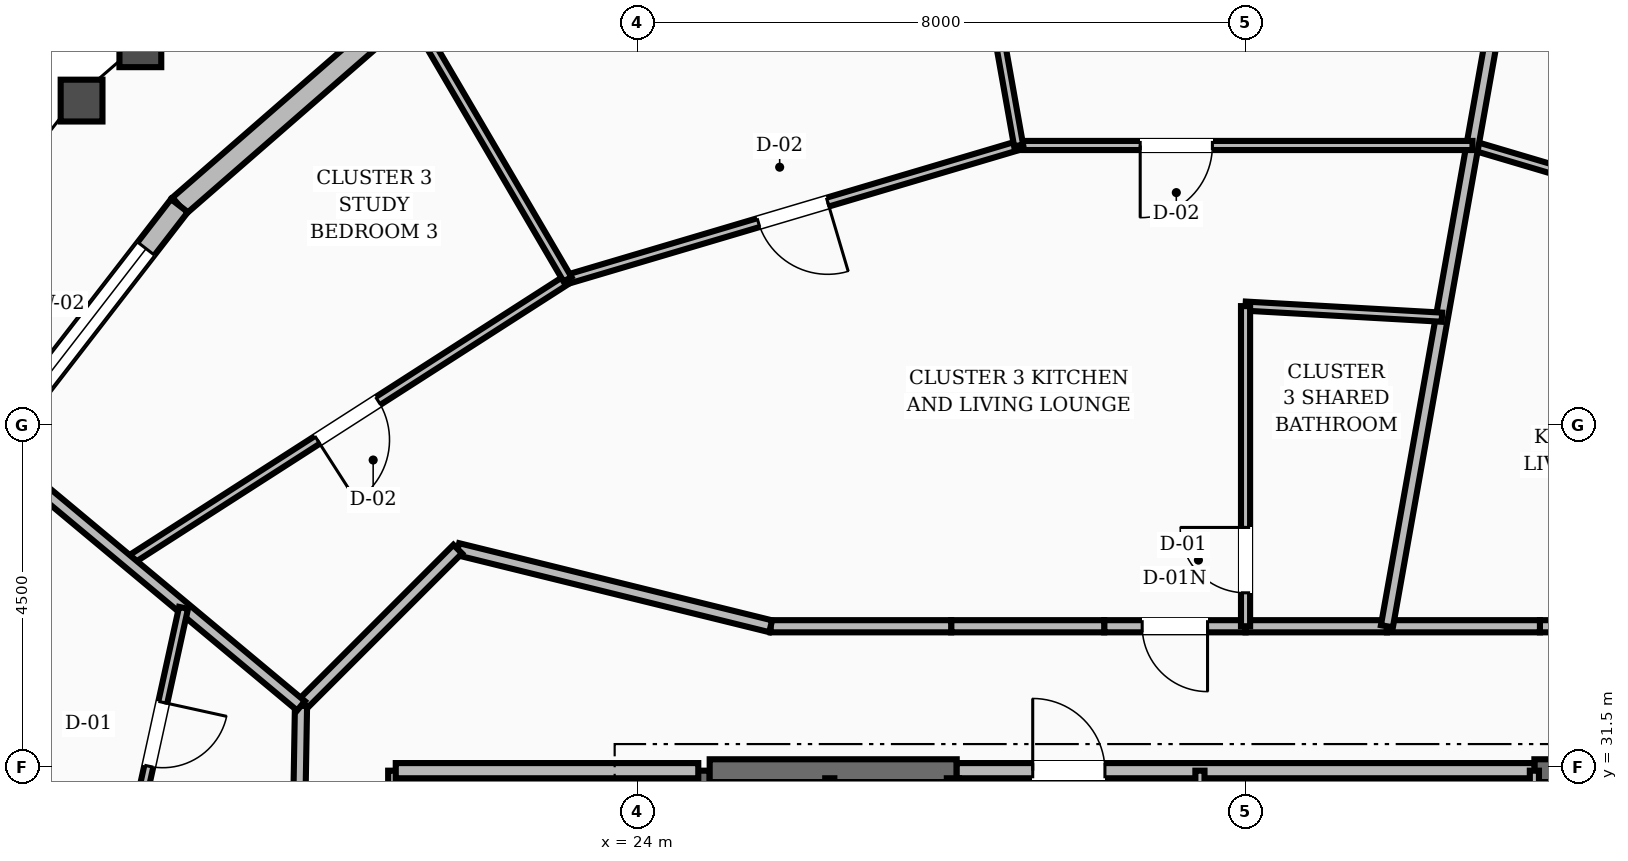
"""IFC4 building model, lengths in metres.
Left out: names, types, materials, properties, quantities, classifications, styles, units other than length and angle.
Written with IfcOpenShell. Run it as: python <this file> out.ifc"""

import sys

from ifc_helpers import new_model, si_unit, direction, frame, frame_2d, origin, place, context, subcontext, project, spatial, rectangle, extrude, element, fill, save


model = new_model("IFC4")
c1 = context("Model", 3, precision=1e-05, world=origin(), true_north=direction((0.0, 1.0)))
c2 = subcontext(c1, "Body", "Model", "MODEL_VIEW")
j1 = project(units=[si_unit("LENGTHUNIT", "METRE"), si_unit("PLANEANGLEUNIT", "RADIAN")], contexts=[c1])
p1 = place(None, origin())
s1 = spatial("IfcSite", under=j1, at=p1, CompositionType="ELEMENT")
p2 = place(p1, origin())
s2 = spatial("IfcBuilding", under=s1, at=p2, CompositionType="ELEMENT")
p3 = place(p2, frame((0.0, 0.0, 265.2)))
s3 = spatial("IfcBuildingStorey", under=s2, at=p3, CompositionType="ELEMENT", Elevation=265.2)
p4 = place(p3, frame((24.8, 25.15, 0.0), z_axis=(0.0, 0.0, 1.0), x_axis=(0.0, 1.0, 0.0)))
e1 = element("IfcWall", 1, at=p4, inside=s3, PredefinedType="SHEAR", context=c2, shape_type="SweptSolid", body=[
    extrude(rectangle(XDim=6.3, YDim=0.3, at=frame_2d((3.15, 0.0))), origin(), (0.0, 0.0, 1.0), 3.6),
])
p5 = place(p3, frame((24.95, 31.45, 0.0), z_axis=(0.0, 0.0, 1.0), x_axis=(1.0, 0.0, 0.0)))
e2 = element("IfcWall", 2, at=p5, inside=s3, PredefinedType="SHEAR", context=c2, shape_type="SweptSolid", body=[
    extrude(rectangle(XDim=3.25, YDim=0.3, at=frame_2d((1.625, 0.0))), origin(), (0.0, 0.0, 1.0), 3.6),
])
p6 = place(p3, frame((35.8, 31.45, 0.0), z_axis=(0.0, 0.0, 1.0), x_axis=(1.0, 0.0, 0.0)))
e3 = element("IfcWall", 3, at=p6, inside=s3, PredefinedType="SHEAR", context=c2, shape_type="SweptSolid", body=[
    extrude(rectangle(XDim=3.25, YDim=0.3, at=frame_2d((1.625, 0.0))), origin(), (0.0, 0.0, 1.0), 3.6),
])
p7 = place(p6, frame((0.3, 0.0, 0.0)))
e4 = element("IfcOpeningElement", 4, at=p7, cuts=e3, PredefinedType="OPENING", context=c2, shape_type="SweptSolid", body=[
    extrude(rectangle(XDim=1.1, YDim=2.1, at=frame_2d((0.55, 1.05))), frame((0.0, 0.16, 0.0), z_axis=(0.0, -1.0, 0.0), x_axis=(1.0, 0.0, 0.0)), (0.0, 0.0, 1.0), 0.32),
])
p8 = place(p3, frame((20.979, 41.502, 0.0), z_axis=(0.0, 0.0, 1.0), x_axis=(-0.75414910989, -0.656703220681, 0.0)))
e5 = element("IfcWall", 5, at=p8, inside=s3, PredefinedType="STANDARD", context=c2, shape_type="SweptSolid", body=[
    extrude(rectangle(XDim=3.986, YDim=0.28, at=frame_2d((1.993, 0.0))), origin(), (0.0, 0.0, 1.0), 2.88),
])
p9 = place(p3, frame((17.973, 38.884, 0.0), z_axis=(0.0, 0.0, 1.0), x_axis=(-0.611762796107, -0.791041263968, 0.0)))
e6 = element("IfcWall", 6, at=p9, inside=s3, PredefinedType="STANDARD", context=c2, shape_type="SweptSolid", body=[
    extrude(rectangle(XDim=4.032, YDim=0.28, at=frame_2d((2.016, 0.0))), origin(), (0.0, 0.0, 1.0), 2.88),
])
p10 = place(p9, frame((0.716, 0.0, 0.8)))
e7 = element("IfcOpeningElement", 7, at=p10, cuts=e6, PredefinedType="OPENING", context=c2, shape_type="SweptSolid", body=[
    extrude(rectangle(XDim=2.6, YDim=1.65, at=frame_2d((1.3, 0.825))), frame((0.0, 0.15, 0.0), z_axis=(0.0, -1.0, 0.0), x_axis=(1.0, 0.0, 0.0)), (0.0, 0.0, 1.0), 0.3),
])
p11 = place(p3, frame((20.82, 28.32, 0.0), z_axis=(0.0, 0.0, 1.0), x_axis=(0.0, 1.0, 0.0)))
e8 = element("IfcWall", 8, at=p11, inside=s3, PredefinedType="SOLIDWALL", context=c2, shape_type="SweptSolid", body=[
    extrude(rectangle(XDim=3.13, YDim=0.2, at=frame_2d((1.565, 0.0))), origin(), (0.0, 0.0, 1.0), 2.87),
])
p12 = place(p11, frame((1.09, 0.0, 0.0)))
e9 = element("IfcOpeningElement", 9, at=p12, cuts=e8, PredefinedType="OPENING", context=c2, shape_type="SweptSolid", body=[
    extrude(rectangle(XDim=0.95, YDim=2.1, at=frame_2d((0.475, 1.05))), frame((0.0, 0.11, 0.0), z_axis=(0.0, -1.0, 0.0), x_axis=(1.0, 0.0, 0.0)), (0.0, 0.0, 1.0), 0.22),
])
p13 = place(p3, frame((20.82, 31.45, 0.0), z_axis=(0.0, 0.0, 1.0), x_axis=(1.0, 0.0, 0.0)))
e10 = element("IfcWall", 10, at=p13, inside=s3, PredefinedType="SOLIDWALL", context=c2, shape_type="SweptSolid", body=[
    extrude(rectangle(XDim=3.98, YDim=0.2, at=frame_2d((1.99, 0.0))), origin(), (0.0, 0.0, 1.0), 2.87),
])
p14 = place(p3, frame((28.2, 31.45, 0.0), z_axis=(0.0, 0.0, 1.0), x_axis=(1.0, 0.0, 0.0)))
e11 = element("IfcWall", 11, at=p14, inside=s3, PredefinedType="SOLIDWALL", context=c2, shape_type="SweptSolid", body=[
    extrude(rectangle(XDim=7.6, YDim=0.2, at=frame_2d((3.8, 0.0))), origin(), (0.0, 0.0, 1.0), 2.87),
])
p15 = place(p14, frame((1.0, 0.0, 0.0)))
e12 = element("IfcOpeningElement", 12, at=p15, cuts=e11, PredefinedType="OPENING", context=c2, shape_type="SweptSolid", body=[
    extrude(rectangle(XDim=0.95, YDim=2.1, at=frame_2d((0.475, 1.05))), frame((0.0, 0.11, 0.0), z_axis=(0.0, -1.0, 0.0), x_axis=(1.0, 0.0, 0.0)), (0.0, 0.0, 1.0), 0.22),
])
p16 = place(p3, frame((35.8, 27.95, 0.0), z_axis=(0.0, 0.0, 1.0), x_axis=(0.0, 1.0, 0.0)))
e13 = element("IfcWall", 13, at=p16, inside=s3, PredefinedType="PARTITIONING", context=c2, shape_type="SweptSolid", body=[
    extrude(rectangle(XDim=3.5, YDim=0.12, at=frame_2d((1.75, 0.0))), origin(), (0.0, 0.0, 1.0), 2.87),
])
p17 = place(p16, frame((1.275, 0.0, 0.0)))
e14 = element("IfcOpeningElement", 14, at=p17, cuts=e13, PredefinedType="OPENING", context=c2, shape_type="SweptSolid", body=[
    extrude(rectangle(XDim=0.95, YDim=2.1, at=frame_2d((0.475, 1.05))), frame((0.0, 0.07, 0.0), z_axis=(0.0, -1.0, 0.0), x_axis=(1.0, 0.0, 0.0)), (0.0, 0.0, 1.0), 0.14),
])
p18 = place(p3, frame((31.4, 27.95, 0.0), z_axis=(0.0, 0.0, 1.0), x_axis=(0.0, 1.0, 0.0)))
e15 = element("IfcWall", 15, at=p18, inside=s3, PredefinedType="PARTITIONING", context=c2, shape_type="SweptSolid", body=[
    extrude(rectangle(XDim=3.5, YDim=0.12, at=frame_2d((1.75, 0.0))), origin(), (0.0, 0.0, 1.0), 2.87),
])
p19 = place(p3, frame((28.15, 25.25, 0.0), z_axis=(0.0, 0.0, 1.0), x_axis=(0.0, 1.0, 0.0)))
e16 = element("IfcWall", 16, at=p19, inside=s3, PredefinedType="SOLIDWALL", context=c2, shape_type="SweptSolid", body=[
    extrude(rectangle(XDim=6.1, YDim=0.16, at=frame_2d((3.05, 0.0))), origin(), (0.0, 0.0, 1.0), 2.87),
])
p20 = place(p3, frame((26.53, 25.25, 0.0), z_axis=(0.0, 0.0, 1.0), x_axis=(0.0, 1.0, 0.0)))
e17 = element("IfcWall", 17, at=p20, inside=s3, PredefinedType="PARTITIONING", context=c2, shape_type="SweptSolid", body=[
    extrude(rectangle(XDim=6.1, YDim=0.12, at=frame_2d((3.05, 0.0))), origin(), (0.0, 0.0, 1.0), 2.87),
])
p21 = place(p3, frame((38.248, 33.35, 0.0), z_axis=(0.0, 0.0, 1.0), x_axis=(-1.0, 0.0, 0.0)))
e18 = element("IfcWall", 18, at=p21, inside=s3, PredefinedType="SOLIDWALL", context=c2, shape_type="SweptSolid", body=[
    extrude(rectangle(XDim=2.375, YDim=0.16, at=frame_2d((1.188, 0.0))), origin(), (0.0, 0.0, 1.0), 2.87),
])
p22 = place(p3, frame((35.873, 33.35, 0.0), z_axis=(0.0, 0.0, 1.0), x_axis=(-1.0, 0.0, 0.0)))
e19 = element("IfcWall", 19, at=p22, inside=s3, PredefinedType="SOLIDWALL", context=c2, shape_type="SweptSolid", body=[
    extrude(rectangle(XDim=2.013, YDim=0.16, at=frame_2d((1.006, 0.0))), origin(), (0.0, 0.0, 1.0), 2.87),
])
p23 = place(p3, frame((33.86, 33.35, 0.0), z_axis=(0.0, 0.0, 1.0), x_axis=(-1.0, 0.0, 0.0)))
e20 = element("IfcWall", 20, at=p23, inside=s3, PredefinedType="SOLIDWALL", context=c2, shape_type="SweptSolid", body=[
    extrude(rectangle(XDim=1.86, YDim=0.16, at=frame_2d((0.93, 0.0))), origin(), (0.0, 0.0, 1.0), 2.87),
])
p24 = place(p3, frame((32.0, 33.35, 0.0), z_axis=(0.0, 0.0, 1.0), x_axis=(-1.0, 0.0, 0.0)))
e21 = element("IfcWall", 21, at=p24, inside=s3, PredefinedType="SOLIDWALL", context=c2, shape_type="SweptSolid", body=[
    extrude(rectangle(XDim=1.86, YDim=0.16, at=frame_2d((0.93, 0.0))), origin(), (0.0, 0.0, 1.0), 2.87),
])
p25 = place(p24, frame((0.5, 0.0, 0.0)))
e22 = element("IfcOpeningElement", 22, at=p25, cuts=e21, PredefinedType="OPENING", context=c2, shape_type="SweptSolid", body=[
    extrude(rectangle(XDim=0.86, YDim=2.1, at=frame_2d((0.43, 1.05))), frame((0.0, 0.09, 0.0), z_axis=(0.0, -1.0, 0.0), x_axis=(1.0, 0.0, 0.0)), (0.0, 0.0, 1.0), 0.18),
])
p26 = place(p3, frame((30.14, 33.35, 0.0), z_axis=(0.0, 0.0, 1.0), x_axis=(-1.0, 0.0, 0.0)))
e23 = element("IfcWall", 23, at=p26, inside=s3, PredefinedType="SOLIDWALL", context=c2, shape_type="SweptSolid", body=[
    extrude(rectangle(XDim=2.013, YDim=0.16, at=frame_2d((1.006, 0.0))), origin(), (0.0, 0.0, 1.0), 2.87),
])
p27 = place(p3, frame((28.127, 33.35, 0.0), z_axis=(0.0, 0.0, 1.0), x_axis=(-1.0, 0.0, 0.0)))
e24 = element("IfcWall", 24, at=p27, inside=s3, PredefinedType="SOLIDWALL", context=c2, shape_type="SweptSolid", body=[
    extrude(rectangle(XDim=2.375, YDim=0.16, at=frame_2d((1.188, 0.0))), origin(), (0.0, 0.0, 1.0), 2.87),
])
p28 = place(p3, frame((25.752, 33.35, 0.0), z_axis=(0.0, 0.0, 1.0), x_axis=(-0.970939799552, 0.239323850978, 0.0)))
e25 = element("IfcWall", 25, at=p28, inside=s3, PredefinedType="SOLIDWALL", context=c2, shape_type="SweptSolid", body=[
    extrude(rectangle(XDim=4.241, YDim=0.16, at=frame_2d((2.12, 0.0))), origin(), (0.0, 0.0, 1.0), 2.87),
])
p29 = place(p3, frame((21.635, 34.365, 0.0), z_axis=(0.0, 0.0, 1.0), x_axis=(-0.707106781187, -0.707106781187, 0.0)))
e26 = element("IfcWall", 26, at=p29, inside=s3, PredefinedType="SOLIDWALL", context=c2, shape_type="SweptSolid", body=[
    extrude(rectangle(XDim=2.916, YDim=0.16, at=frame_2d((1.458, 0.0))), origin(), (0.0, 0.0, 1.0), 2.87),
])
p30 = place(p3, frame((19.573, 32.303, 0.0), z_axis=(0.0, 0.0, 1.0), x_axis=(-0.016981035134, -0.999855811828, 0.0)))
e27 = element("IfcWall", 27, at=p30, inside=s3, PredefinedType="SOLIDWALL", context=c2, shape_type="SweptSolid", body=[
    extrude(rectangle(XDim=3.134, YDim=0.16, at=frame_2d((1.567, 0.0))), origin(), (0.0, 0.0, 1.0), 2.87),
])
p31 = place(p3, frame((40.92, 37.915, 0.0), z_axis=(0.0, 0.0, 1.0), x_axis=(-0.958730048682, 0.284317944833, 0.0)))
e28 = element("IfcWall", 28, at=p31, inside=s3, PredefinedType="PARTITIONING", context=c2, shape_type="SweptSolid", body=[
    extrude(rectangle(XDim=6.19, YDim=0.12, at=frame_2d((3.095, 0.0))), origin(), (0.0, 0.0, 1.0), 2.87),
])
p32 = place(p31, frame((2.62, 0.0, 0.0)))
e29 = element("IfcOpeningElement", 29, at=p32, cuts=e28, PredefinedType="OPENING", context=c2, shape_type="SweptSolid", body=[
    extrude(rectangle(XDim=0.95, YDim=2.1, at=frame_2d((0.475, 1.05))), frame((0.0, 0.07, 0.0), z_axis=(0.0, -1.0, 0.0), x_axis=(1.0, 0.0, 0.0)), (0.0, 0.0, 1.0), 0.14),
])
p33 = place(p3, frame((33.86, 33.35, 0.0), z_axis=(0.0, 0.0, 1.0), x_axis=(0.175206916814, 0.984531632961, 0.0)))
e30 = element("IfcWall", 30, at=p33, inside=s3, PredefinedType="SOLIDWALL", context=c2, shape_type="SweptSolid", body=[
    extrude(rectangle(XDim=11.422, YDim=0.16, at=frame_2d((5.711, 0.0))), origin(), (0.0, 0.0, 1.0), 2.87),
])
p34 = place(p3, frame((34.583, 37.416, 0.0), z_axis=(0.0, 0.0, 1.0), x_axis=(-0.99841237493, 0.056326988077, 0.0)))
e31 = element("IfcWall", 31, at=p34, inside=s3, PredefinedType="PARTITIONING", context=c2, shape_type="SweptSolid", body=[
    extrude(rectangle(XDim=2.588, YDim=0.12, at=frame_2d((1.294, 0.0))), origin(), (0.0, 0.0, 1.0), 2.87),
])
p35 = place(p3, frame((32.0, 33.35, 0.0), z_axis=(0.0, 0.0, 1.0), x_axis=(0.0, 1.0, 0.0)))
e32 = element("IfcWall", 32, at=p35, inside=s3, PredefinedType="PARTITIONING", context=c2, shape_type="SweptSolid", body=[
    extrude(rectangle(XDim=4.212, YDim=0.12, at=frame_2d((2.106, 0.0))), origin(), (0.0, 0.0, 1.0), 2.87),
])
p36 = place(p35, frame((0.44, 0.0, 0.0)))
e33 = element("IfcOpeningElement", 33, at=p36, cuts=e32, PredefinedType="OPENING", context=c2, shape_type="SweptSolid", body=[
    extrude(rectangle(XDim=0.86, YDim=2.1, at=frame_2d((0.43, 1.05))), frame((0.0, 0.07, 0.0), z_axis=(0.0, -1.0, 0.0), x_axis=(1.0, 0.0, 0.0)), (0.0, 0.0, 1.0), 0.14),
])
p37 = place(p3, frame((34.986, 39.675, 0.0), z_axis=(0.0, 0.0, 1.0), x_axis=(-1.0, 0.0, 0.0)))
e34 = element("IfcWall", 34, at=p37, inside=s3, PredefinedType="PARTITIONING", context=c2, shape_type="SweptSolid", body=[
    extrude(rectangle(XDim=5.971, YDim=0.12, at=frame_2d((2.986, 0.0))), origin(), (0.0, 0.0, 1.0), 2.87),
])
p38 = place(p37, frame((3.421, 0.0, 0.0)))
e35 = element("IfcOpeningElement", 35, at=p38, cuts=e34, PredefinedType="OPENING", context=c2, shape_type="SweptSolid", body=[
    extrude(rectangle(XDim=0.95, YDim=2.1, at=frame_2d((0.475, 1.05))), frame((0.0, 0.07, 0.0), z_axis=(0.0, -1.0, 0.0), x_axis=(1.0, 0.0, 0.0)), (0.0, 0.0, 1.0), 0.14),
])
p39 = place(p3, frame((29.014, 39.675, 0.0), z_axis=(0.0, 0.0, 1.0), x_axis=(-0.958730048682, -0.284317944833, 0.0)))
e36 = element("IfcWall", 36, at=p39, inside=s3, PredefinedType="PARTITIONING", context=c2, shape_type="SweptSolid", body=[
    extrude(rectangle(XDim=6.19, YDim=0.12, at=frame_2d((3.095, 0.0))), origin(), (0.0, 0.0, 1.0), 2.87),
])
p40 = place(p39, frame((2.62, 0.0, 0.0)))
e37 = element("IfcOpeningElement", 37, at=p40, cuts=e36, PredefinedType="OPENING", context=c2, shape_type="SweptSolid", body=[
    extrude(rectangle(XDim=0.95, YDim=2.1, at=frame_2d((0.475, 1.05))), frame((0.0, 0.07, 0.0), z_axis=(0.0, -1.0, 0.0), x_axis=(1.0, 0.0, 0.0)), (0.0, 0.0, 1.0), 0.14),
])
p41 = place(p3, frame((29.014, 39.675, 0.0), z_axis=(0.0, 0.0, 1.0), x_axis=(-0.175178551936, 0.984536680343, 0.0)))
e38 = element("IfcWall", 38, at=p41, inside=s3, PredefinedType="PARTITIONING", context=c2, shape_type="SweptSolid", body=[
    extrude(rectangle(XDim=4.998, YDim=0.12, at=frame_2d((2.499, 0.0))), origin(), (0.0, 0.0, 1.0), 2.87),
])
p42 = place(p3, frame((23.08, 37.915, 0.0), z_axis=(0.0, 0.0, 1.0), x_axis=(-0.841538391424, -0.540197311878, 0.0)))
e39 = element("IfcWall", 39, at=p42, inside=s3, PredefinedType="PARTITIONING", context=c2, shape_type="SweptSolid", body=[
    extrude(rectangle(XDim=6.873, YDim=0.12, at=frame_2d((3.437, 0.0))), origin(), (0.0, 0.0, 1.0), 2.87),
])
p43 = place(p42, frame((2.961, 0.0, 0.0)))
e40 = element("IfcOpeningElement", 40, at=p43, cuts=e39, PredefinedType="OPENING", context=c2, shape_type="SweptSolid", body=[
    extrude(rectangle(XDim=0.95, YDim=2.1, at=frame_2d((0.475, 1.05))), frame((0.0, 0.07, 0.0), z_axis=(0.0, -1.0, 0.0), x_axis=(1.0, 0.0, 0.0)), (0.0, 0.0, 1.0), 0.14),
])
p44 = place(p3, frame((23.08, 37.915, 0.0), z_axis=(0.0, 0.0, 1.0), x_axis=(-0.505267765721, 0.862962620814, 0.0)))
e41 = element("IfcWall", 41, at=p44, inside=s3, PredefinedType="PARTITIONING", context=c2, shape_type="SweptSolid", body=[
    extrude(rectangle(XDim=4.106, YDim=0.12, at=frame_2d((2.053, 0.0))), origin(), (0.0, 0.0, 1.0), 2.87),
])
p45 = place(p3, frame((19.573, 32.303, 0.0), z_axis=(0.0, 0.0, 1.0), x_axis=(-0.76801521487, 0.640431596448, 0.0)))
e42 = element("IfcWall", 42, at=p45, inside=s3, PredefinedType="SOLIDWALL", context=c2, shape_type="SweptSolid", body=[
    extrude(rectangle(XDim=5.245, YDim=0.16, at=frame_2d((2.623, 0.0))), origin(), (0.0, 0.0, 1.0), 2.87),
])
p46 = place(p3, frame((18.028, 33.592, 0.0), z_axis=(0.0, 0.0, 1.0), x_axis=(-0.214325537639, -0.976762286289, 0.0)))
e43 = element("IfcWall", 43, at=p46, inside=s3, PredefinedType="PARTITIONING", context=c2, shape_type="SweptSolid", body=[
    extrude(rectangle(XDim=3.405, YDim=0.12, at=frame_2d((1.702, 0.0))), origin(), (0.0, 0.0, 1.0), 2.87),
])
p47 = place(p46, frame((1.272, 0.0, 0.0)))
e44 = element("IfcOpeningElement", 44, at=p47, cuts=e43, PredefinedType="OPENING", context=c2, shape_type="SweptSolid", body=[
    extrude(rectangle(XDim=0.86, YDim=2.1, at=frame_2d((0.43, 1.05))), frame((0.0, 0.07, 0.0), z_axis=(0.0, -1.0, 0.0), x_axis=(1.0, 0.0, 0.0)), (0.0, 0.0, 1.0), 0.14),
])
p48 = place(p10, origin())
e45 = element("IfcWindow", 45, at=p48, inside=s3, PartitioningType="SINGLE_PANEL", PredefinedType="WINDOW", context=c2, shape_type="SweptSolid", body=[
    extrude(rectangle(XDim=2.6, YDim=1.65, at=frame_2d((1.3, 0.825))), frame((0.0, 0.03, 0.0), z_axis=(0.0, -1.0, 0.0), x_axis=(1.0, 0.0, 0.0)), (0.0, 0.0, 1.0), 0.06),
])
fill(e7, e45)
p49 = place(p15, origin())
e46 = element("IfcDoor", 46, at=p49, inside=s3, OperationType="SINGLE_SWING_LEFT", PredefinedType="DOOR", context=c2, shape_type="SweptSolid", body=[
    extrude(rectangle(XDim=0.95, YDim=2.1, at=frame_2d((0.475, 1.05))), frame((0.0, 0.025, 0.0), z_axis=(0.0, -1.0, 0.0), x_axis=(1.0, 0.0, 0.0)), (0.0, 0.0, 1.0), 0.05),
])
fill(e12, e46)
p50 = place(p36, origin())
e47 = element("IfcDoor", 47, at=p50, inside=s3, OperationType="SINGLE_SWING_RIGHT", PredefinedType="DOOR", context=c2, shape_type="SweptSolid", body=[
    extrude(rectangle(XDim=0.86, YDim=2.1, at=frame_2d((0.43, 1.05))), frame((0.0, 0.025, 0.0), z_axis=(0.0, -1.0, 0.0), x_axis=(1.0, 0.0, 0.0)), (0.0, 0.0, 1.0), 0.05),
])
fill(e33, e47)
p51 = place(p25, origin())
e48 = element("IfcDoor", 48, at=p51, inside=s3, OperationType="SINGLE_SWING_LEFT", PredefinedType="DOOR", context=c2, shape_type="SweptSolid", body=[
    extrude(rectangle(XDim=0.86, YDim=2.1, at=frame_2d((0.43, 1.05))), frame((0.0, 0.025, 0.0), z_axis=(0.0, -1.0, 0.0), x_axis=(1.0, 0.0, 0.0)), (0.0, 0.0, 1.0), 0.05),
])
fill(e22, e48)
p52 = place(p38, origin())
e49 = element("IfcDoor", 49, at=p52, inside=s3, OperationType="SINGLE_SWING_RIGHT", PredefinedType="DOOR", context=c2, shape_type="SweptSolid", body=[
    extrude(rectangle(XDim=0.95, YDim=2.1, at=frame_2d((0.475, 1.05))), frame((0.0, 0.025, 0.0), z_axis=(0.0, -1.0, 0.0), x_axis=(1.0, 0.0, 0.0)), (0.0, 0.0, 1.0), 0.05),
])
fill(e35, e49)
p53 = place(p40, origin())
e50 = element("IfcDoor", 50, at=p53, inside=s3, OperationType="SINGLE_SWING_LEFT", PredefinedType="DOOR", context=c2, shape_type="SweptSolid", body=[
    extrude(rectangle(XDim=0.95, YDim=2.1, at=frame_2d((0.475, 1.05))), frame((0.0, 0.025, 0.0), z_axis=(0.0, -1.0, 0.0), x_axis=(1.0, 0.0, 0.0)), (0.0, 0.0, 1.0), 0.05),
])
fill(e37, e50)
p54 = place(p43, origin())
e51 = element("IfcDoor", 51, at=p54, inside=s3, OperationType="SINGLE_SWING_RIGHT", PredefinedType="DOOR", context=c2, shape_type="SweptSolid", body=[
    extrude(rectangle(XDim=0.95, YDim=2.1, at=frame_2d((0.475, 1.05))), frame((0.0, 0.025, 0.0), z_axis=(0.0, -1.0, 0.0), x_axis=(1.0, 0.0, 0.0)), (0.0, 0.0, 1.0), 0.05),
])
fill(e40, e51)
p55 = place(p47, origin())
e52 = element("IfcDoor", 52, at=p55, inside=s3, OperationType="SINGLE_SWING_LEFT", PredefinedType="DOOR", context=c2, shape_type="SweptSolid", body=[
    extrude(rectangle(XDim=0.86, YDim=2.1, at=frame_2d((0.43, 1.05))), frame((0.0, 0.025, 0.0), z_axis=(0.0, -1.0, 0.0), x_axis=(1.0, 0.0, 0.0)), (0.0, 0.0, 1.0), 0.05),
])
fill(e44, e52)
save(model, sys.argv[1])
